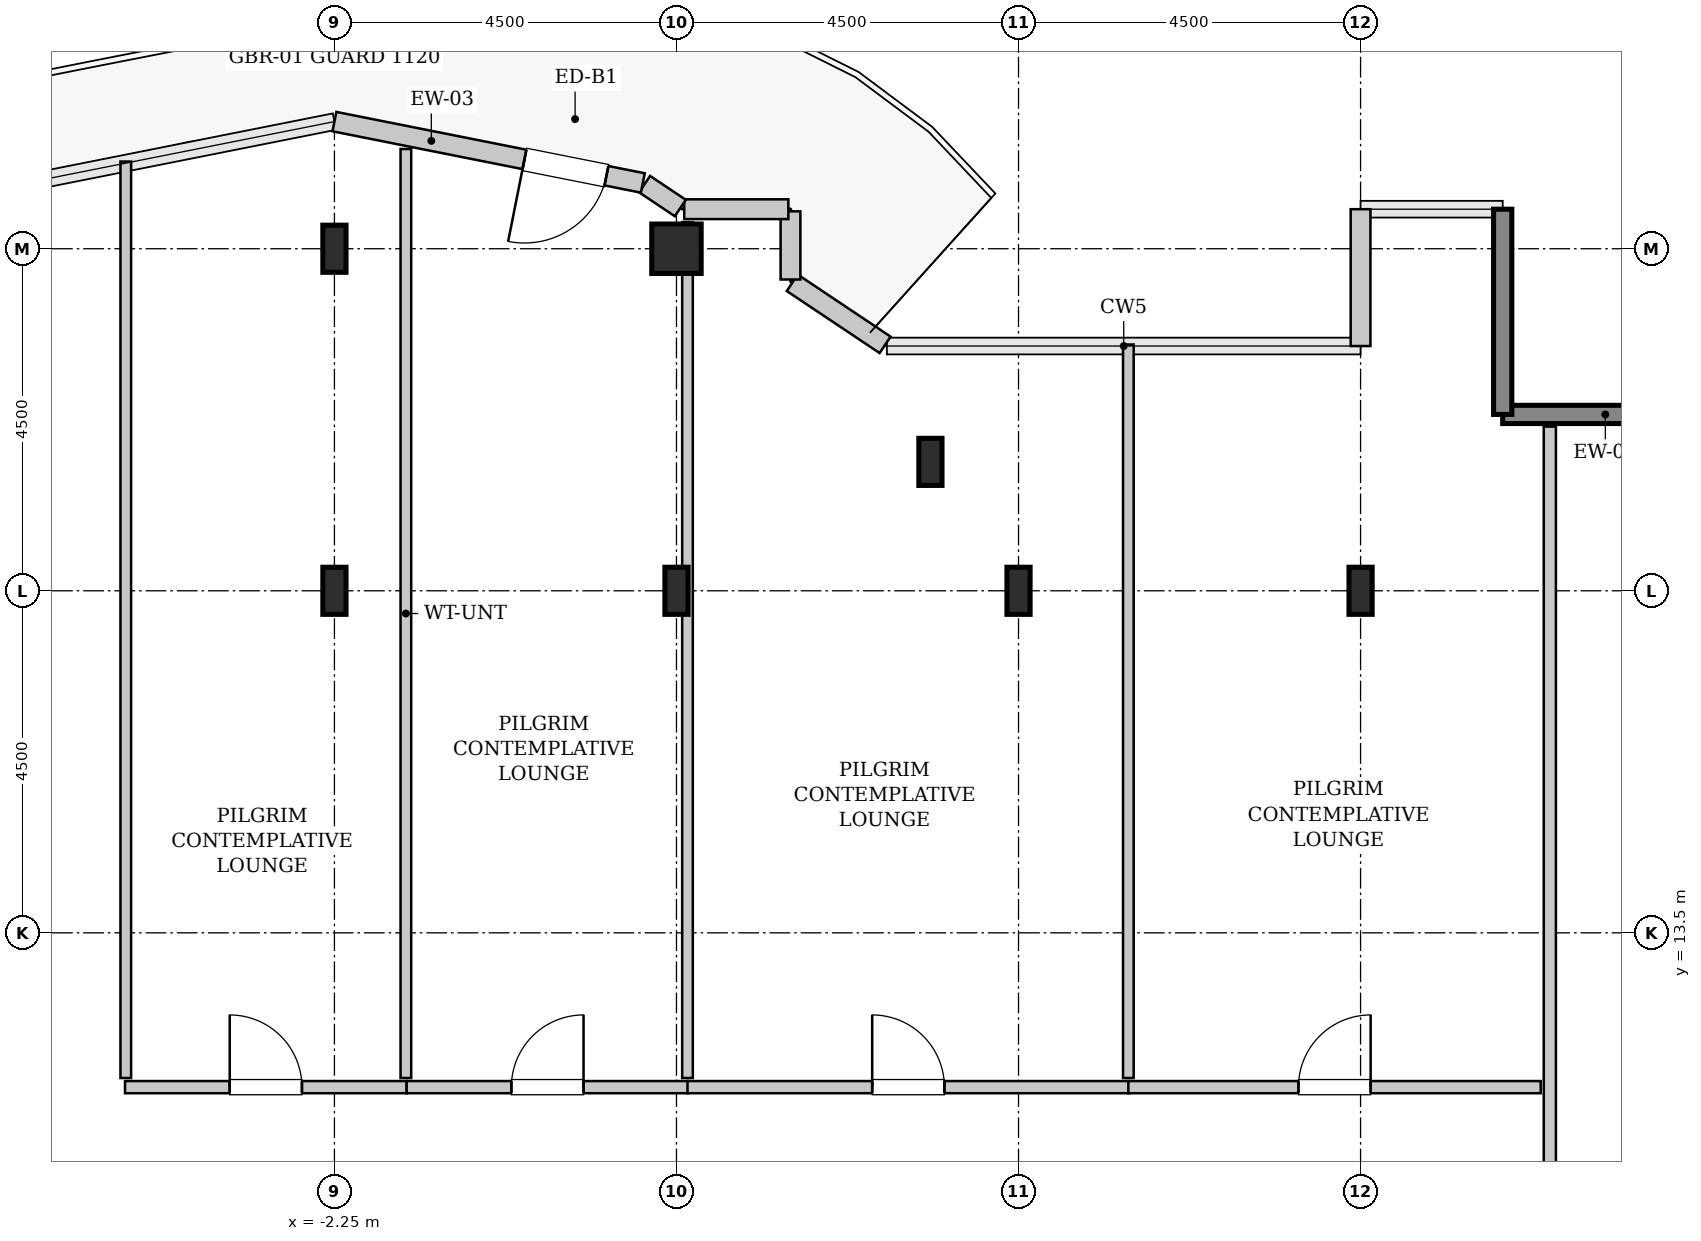
"""IFC4 building model, lengths in metres.
Left out: names, types, materials, properties, quantities, classifications, styles, units other than length and angle.
Written with IfcOpenShell. Run it as: python <this file> out.ifc"""

import sys

from ifc_helpers import new_model, si_unit, direction, frame, frame_2d, origin, origin_2d, place, context, subcontext, project, spatial, rectangle, hollow_rectangle, i_section, extrude, source, transform, mapped, element, fill, save


model = new_model("IFC4")
c1 = context("Model", 3, precision=1e-05, world=origin(), true_north=direction((0.0, 1.0)))
c2 = subcontext(c1, "Body", "Model", "MODEL_VIEW")
j1 = project(units=[si_unit("LENGTHUNIT", "METRE"), si_unit("PLANEANGLEUNIT", "RADIAN")], contexts=[c1])
p1 = place(None, origin())
s1 = spatial("IfcSite", under=j1, at=p1, CompositionType="ELEMENT")
p2 = place(p1, origin())
s2 = spatial("IfcBuilding", under=s1, at=p2, CompositionType="ELEMENT")
p3 = place(p2, frame((0.0, 0.0, 272.2)))
s3 = spatial("IfcBuildingStorey", under=s2, at=p3, CompositionType="ELEMENT", Elevation=272.2)
m1 = source(origin(), c2, "Body", "SweptSolid", [
    extrude(i_section(OverallWidth=0.305, OverallDepth=0.62, WebThickness=0.021, FlangeThickness=0.04, FilletRadius=0.027, at=origin_2d()), origin(), (0.0, 0.0, 1.0), 3.8),
])
for number, where, z_axis, x_axis in (
    (1, (-2.25, 18.0, 0.0), (0.0, 0.0, 1.0), (1.0, 0.0, 0.0)),
    (2, (-2.25, 22.5, 0.0), (0.0, 0.0, 1.0), (1.0, 0.0, 0.0)),
    (3, (2.25, 18.0, 0.0), (0.0, 0.0, 1.0), (1.0, 0.0, 0.0)),
):
    element("IfcColumn", number, at=place(p3, frame(where, z_axis=z_axis, x_axis=x_axis)), inside=s3, PredefinedType="COLUMN", context=c2, shape_type="MappedRepresentation", body=[
        mapped(m1, transform((0.0, 0.0, 0.0), x_axis=(1.0, 0.0, 0.0), y_axis=(0.0, 1.0, 0.0), z_axis=(0.0, 0.0, 1.0), scale=1.0)),
    ])
m2 = source(origin(), c2, "Body", "SweptSolid", [
    extrude(hollow_rectangle(XDim=0.65, YDim=0.65, WallThickness=0.032, InnerFilletRadius=0.032, OuterFilletRadius=0.064, at=origin_2d()), origin(), (0.0, 0.0, 1.0), 3.8),
])
p4 = place(p3, frame((2.25, 22.5, 0.0), z_axis=(0.0, 0.0, 1.0), x_axis=(1.0, 0.0, 0.0)))
e4 = element("IfcColumn", 4, at=p4, inside=s3, PredefinedType="COLUMN", context=c2, shape_type="MappedRepresentation", body=[
    mapped(m2, transform((0.0, 0.0, 0.0), x_axis=(1.0, 0.0, 0.0), y_axis=(0.0, 1.0, 0.0), z_axis=(0.0, 0.0, 1.0), scale=1.0)),
])
for number, where, z_axis, x_axis in (
    (5, (5.591, 19.696, 0.0), (0.0, 0.0, 1.0), (1.0, 0.0, 0.0)),
    (6, (6.75, 18.0, 0.0), (0.0, 0.0, 1.0), (1.0, 0.0, 0.0)),
    (7, (11.25, 18.0, 0.0), (0.0, 0.0, 1.0), (1.0, 0.0, 0.0)),
):
    element("IfcColumn", number, at=place(p3, frame(where, z_axis=z_axis, x_axis=x_axis)), inside=s3, PredefinedType="COLUMN", context=c2, shape_type="MappedRepresentation", body=[
        mapped(m1, transform((0.0, 0.0, 0.0), x_axis=(1.0, 0.0, 0.0), y_axis=(0.0, 1.0, 0.0), z_axis=(0.0, 0.0, 1.0), scale=1.0)),
    ])
m3 = source(origin(), c2, "Body", "SweptSolid", [
    extrude(rectangle(XDim=2.7, YDim=0.24, at=frame_2d((1.35, 0.0))), origin(), (0.0, 0.0, 1.0), 3.55),
])
for number, where, z_axis, x_axis in (
    (8, (15.82, 20.32, 0.0), (0.0, 0.0, 1.0), (-1.0, 0.0, 0.0)),
    (9, (13.12, 20.32, 0.0), (0.0, 0.0, 1.0), (0.0, 1.0, 0.0)),
):
    element("IfcWall", number, at=place(p3, frame(where, z_axis=z_axis, x_axis=x_axis)), inside=s3, PredefinedType="SHEAR", context=c2, shape_type="MappedRepresentation", body=[
        mapped(m3, transform((0.0, 0.0, 0.0), x_axis=(1.0, 0.0, 0.0), y_axis=(0.0, 1.0, 0.0), z_axis=(0.0, 0.0, 1.0), scale=1.0)),
    ])
m4 = source(origin(), c2, "Body", "SweptSolid", [
    extrude(rectangle(XDim=1.8, YDim=0.26, at=frame_2d((0.9, 0.0))), origin(), (0.0, 0.0, 1.0), 3.55),
])
p5 = place(p3, frame((11.25, 23.02, 0.0), z_axis=(0.0, 0.0, 1.0), x_axis=(0.0, -1.0, 0.0)))
e10 = element("IfcWall", 10, at=p5, inside=s3, PredefinedType="SOLIDWALL", context=c2, shape_type="MappedRepresentation", body=[
    mapped(m4, transform((0.0, 0.0, 0.0), x_axis=(1.0, 0.0, 0.0), y_axis=(0.0, 1.0, 0.0), z_axis=(0.0, 0.0, 1.0), scale=1.0)),
])
m5 = source(origin(), c2, "Body", "SweptSolid", [
    extrude(rectangle(XDim=1.469, YDim=0.26, at=frame_2d((0.734, 0.0))), origin(), (0.0, 0.0, 1.0), 3.55),
])
p6 = place(p3, frame((4.995, 21.236, 0.0), z_axis=(0.0, 0.0, 1.0), x_axis=(-0.831461760506, 0.555581983884, 0.0)))
e11 = element("IfcWall", 11, at=p6, inside=s3, PredefinedType="SOLIDWALL", context=c2, shape_type="MappedRepresentation", body=[
    mapped(m5, transform((0.0, 0.0, 0.0), x_axis=(1.0, 0.0, 0.0), y_axis=(0.0, 1.0, 0.0), z_axis=(0.0, 0.0, 1.0), scale=1.0)),
])
m6 = source(origin(), c2, "Body", "SweptSolid", [
    extrude(rectangle(XDim=0.897, YDim=0.26, at=frame_2d((0.448, 0.0))), origin(), (0.0, 0.0, 1.0), 3.55),
])
p7 = place(p3, frame((3.75, 22.095, 0.0), z_axis=(0.0, 0.0, 1.0), x_axis=(0.0, 1.0, 0.0)))
e12 = element("IfcWall", 12, at=p7, inside=s3, PredefinedType="SOLIDWALL", context=c2, shape_type="MappedRepresentation", body=[
    mapped(m6, transform((0.0, 0.0, 0.0), x_axis=(1.0, 0.0, 0.0), y_axis=(0.0, 1.0, 0.0), z_axis=(0.0, 0.0, 1.0), scale=1.0)),
])
m7 = source(origin(), c2, "Body", "SweptSolid", [
    extrude(rectangle(XDim=1.37, YDim=0.26, at=frame_2d((0.685, 0.0))), origin(), (0.0, 0.0, 1.0), 3.55),
])
p8 = place(p3, frame((3.722, 23.02, 0.0), z_axis=(0.0, 0.0, 1.0), x_axis=(-1.0, 0.0, 0.0)))
e13 = element("IfcWall", 13, at=p8, inside=s3, PredefinedType="SOLIDWALL", context=c2, shape_type="MappedRepresentation", body=[
    mapped(m7, transform((0.0, 0.0, 0.0), x_axis=(1.0, 0.0, 0.0), y_axis=(0.0, 1.0, 0.0), z_axis=(0.0, 0.0, 1.0), scale=1.0)),
])
m8 = source(origin(), c2, "Body", "SweptSolid", [
    extrude(rectangle(XDim=0.565, YDim=0.26, at=frame_2d((0.283, 0.0))), origin(), (0.0, 0.0, 1.0), 3.55),
])
p9 = place(p3, frame((2.301, 23.036, 0.0), z_axis=(0.0, 0.0, 1.0), x_axis=(-0.831651492666, 0.555297933317, 0.0)))
e14 = element("IfcWall", 14, at=p9, inside=s3, PredefinedType="SOLIDWALL", context=c2, shape_type="MappedRepresentation", body=[
    mapped(m8, transform((0.0, 0.0, 0.0), x_axis=(1.0, 0.0, 0.0), y_axis=(0.0, 1.0, 0.0), z_axis=(0.0, 0.0, 1.0), scale=1.0)),
])
m9 = source(origin(), c2, "Body", "SweptSolid", [
    extrude(rectangle(XDim=4.137, YDim=0.26, at=frame_2d((2.068, 0.0))), origin(), (0.0, 0.0, 1.0), 3.55),
])
p10 = place(p3, frame((1.807, 23.365, 0.0), z_axis=(0.0, 0.0, 1.0), x_axis=(-0.980782170794, 0.195105954428, 0.0)))
e15 = element("IfcWall", 15, at=p10, inside=s3, PredefinedType="SOLIDWALL", context=c2, shape_type="MappedRepresentation", body=[
    mapped(m9, transform((0.0, 0.0, 0.0), x_axis=(1.0, 0.0, 0.0), y_axis=(0.0, 1.0, 0.0), z_axis=(0.0, 0.0, 1.0), scale=1.0)),
])
p11 = place(p10, frame((0.488, 0.0, 0.0)))
e16 = element("IfcOpeningElement", 16, at=p11, cuts=e15, PredefinedType="OPENING", context=c2, shape_type="SweptSolid", body=[
    extrude(rectangle(XDim=1.1, YDim=2.2, at=frame_2d((0.55, 1.1))), frame((0.0, 0.14, 0.0), z_axis=(0.0, -1.0, 0.0), x_axis=(1.0, 0.0, 0.0)), (0.0, 0.0, 1.0), 0.28),
])
m10 = source(origin(), c2, "Body", "SweptSolid", [
    extrude(rectangle(XDim=11.665, YDim=0.16, at=frame_2d((5.833, 0.0))), origin(), (0.0, 0.0, 1.0), 3.535),
])
p12 = place(p3, frame((13.74, 8.495, 0.0), z_axis=(0.0, 0.0, 1.0), x_axis=(0.0, 1.0, 0.0)))
e17 = element("IfcWall", 17, at=p12, inside=s3, PredefinedType="PARTITIONING", context=c2, shape_type="MappedRepresentation", body=[
    mapped(m10, transform((0.0, 0.0, 0.0), x_axis=(1.0, 0.0, 0.0), y_axis=(0.0, 1.0, 0.0), z_axis=(0.0, 0.0, 1.0), scale=1.0)),
])
p13 = place(p12, frame((1.032, 0.0, 0.0)))
e18 = element("IfcOpeningElement", 18, at=p13, cuts=e17, PredefinedType="OPENING", context=c2, shape_type="SweptSolid", body=[
    extrude(rectangle(XDim=0.95, YDim=2.1, at=frame_2d((0.475, 1.05))), frame((0.0, 0.09, 0.0), z_axis=(0.0, -1.0, 0.0), x_axis=(1.0, 0.0, 0.0)), (0.0, 0.0, 1.0), 0.18),
])
m11 = source(origin(), c2, "Body", "SweptSolid", [
    extrude(rectangle(XDim=3.705, YDim=0.16, at=frame_2d((1.853, 0.0))), origin(), (0.0, 0.0, 1.0), 3.535),
])
p14 = place(p3, frame((-5.005, 11.47, 0.0), z_axis=(0.0, 0.0, 1.0), x_axis=(1.0, 0.0, 0.0)))
e19 = element("IfcWall", 19, at=p14, inside=s3, PredefinedType="PARTITIONING", context=c2, shape_type="MappedRepresentation", body=[
    mapped(m11, transform((0.0, 0.0, 0.0), x_axis=(1.0, 0.0, 0.0), y_axis=(0.0, 1.0, 0.0), z_axis=(0.0, 0.0, 1.0), scale=1.0)),
])
p15 = place(p14, frame((1.377, 0.0, 0.0)))
e20 = element("IfcOpeningElement", 20, at=p15, cuts=e19, PredefinedType="OPENING", context=c2, shape_type="SweptSolid", body=[
    extrude(rectangle(XDim=0.95, YDim=2.1, at=frame_2d((0.475, 1.05))), frame((0.0, 0.09, 0.0), z_axis=(0.0, -1.0, 0.0), x_axis=(1.0, 0.0, 0.0)), (0.0, 0.0, 1.0), 0.18),
])
m12 = source(origin(), c2, "Body", "SweptSolid", [
    extrude(rectangle(XDim=12.222, YDim=0.14, at=frame_2d((6.111, 0.0))), origin(), (0.0, 0.0, 1.0), 3.535),
])
p16 = place(p3, frame((-1.31, 11.59, 0.0), z_axis=(0.0, 0.0, 1.0), x_axis=(0.0, 1.0, 0.0)))
e21 = element("IfcWall", 21, at=p16, inside=s3, PredefinedType="PARTITIONING", context=c2, shape_type="MappedRepresentation", body=[
    mapped(m12, transform((0.0, 0.0, 0.0), x_axis=(1.0, 0.0, 0.0), y_axis=(0.0, 1.0, 0.0), z_axis=(0.0, 0.0, 1.0), scale=1.0)),
])
m13 = source(origin(), c2, "Body", "SweptSolid", [
    extrude(rectangle(XDim=12.057, YDim=0.14, at=frame_2d((6.028, 0.0))), origin(), (0.0, 0.0, 1.0), 3.535),
])
p17 = place(p3, frame((-4.995, 11.59, 0.0), z_axis=(0.0, 0.0, 1.0), x_axis=(0.0, 1.0, 0.0)))
e22 = element("IfcWall", 22, at=p17, inside=s3, PredefinedType="PARTITIONING", context=c2, shape_type="MappedRepresentation", body=[
    mapped(m13, transform((0.0, 0.0, 0.0), x_axis=(1.0, 0.0, 0.0), y_axis=(0.0, 1.0, 0.0), z_axis=(0.0, 0.0, 1.0), scale=1.0)),
])
m14 = source(origin(), c2, "Body", "SweptSolid", [
    extrude(rectangle(XDim=3.705, YDim=0.16, at=frame_2d((1.853, 0.0))), origin(), (0.0, 0.0, 1.0), 3.535),
])
p18 = place(p3, frame((-1.3, 11.47, 0.0), z_axis=(0.0, 0.0, 1.0), x_axis=(1.0, 0.0, 0.0)))
e23 = element("IfcWall", 23, at=p18, inside=s3, PredefinedType="PARTITIONING", context=c2, shape_type="MappedRepresentation", body=[
    mapped(m14, transform((0.0, 0.0, 0.0), x_axis=(1.0, 0.0, 0.0), y_axis=(0.0, 1.0, 0.0), z_axis=(0.0, 0.0, 1.0), scale=1.0)),
])
p19 = place(p18, frame((1.377, 0.0, 0.0)))
e24 = element("IfcOpeningElement", 24, at=p19, cuts=e23, PredefinedType="OPENING", context=c2, shape_type="SweptSolid", body=[
    extrude(rectangle(XDim=0.95, YDim=2.1, at=frame_2d((0.475, 1.05))), frame((0.0, 0.09, 0.0), z_axis=(0.0, -1.0, 0.0), x_axis=(1.0, 0.0, 0.0)), (0.0, 0.0, 1.0), 0.18),
])
m15 = source(origin(), c2, "Body", "SweptSolid", [
    extrude(rectangle(XDim=11.26, YDim=0.14, at=frame_2d((5.63, 0.0))), origin(), (0.0, 0.0, 1.0), 2.925),
])
p20 = place(p3, frame((2.395, 11.59, 0.0), z_axis=(0.0, 0.0, 1.0), x_axis=(0.0, 1.0, 0.0)))
e25 = element("IfcWall", 25, at=p20, inside=s3, PredefinedType="PARTITIONING", context=c2, shape_type="MappedRepresentation", body=[
    mapped(m15, transform((0.0, 0.0, 0.0), x_axis=(1.0, 0.0, 0.0), y_axis=(0.0, 1.0, 0.0), z_axis=(0.0, 0.0, 1.0), scale=1.0)),
])
m16 = source(origin(), c2, "Body", "SweptSolid", [
    extrude(rectangle(XDim=5.81, YDim=0.16, at=frame_2d((2.905, 0.0))), origin(), (0.0, 0.0, 1.0), 3.535),
])
p21 = place(p3, frame((2.395, 11.47, 0.0), z_axis=(0.0, 0.0, 1.0), x_axis=(1.0, 0.0, 0.0)))
e26 = element("IfcWall", 26, at=p21, inside=s3, PredefinedType="PARTITIONING", context=c2, shape_type="MappedRepresentation", body=[
    mapped(m16, transform((0.0, 0.0, 0.0), x_axis=(1.0, 0.0, 0.0), y_axis=(0.0, 1.0, 0.0), z_axis=(0.0, 0.0, 1.0), scale=1.0)),
])
p22 = place(p21, frame((2.43, 0.0, 0.0)))
e27 = element("IfcOpeningElement", 27, at=p22, cuts=e26, PredefinedType="OPENING", context=c2, shape_type="SweptSolid", body=[
    extrude(rectangle(XDim=0.95, YDim=2.1, at=frame_2d((0.475, 1.05))), frame((0.0, 0.09, 0.0), z_axis=(0.0, -1.0, 0.0), x_axis=(1.0, 0.0, 0.0)), (0.0, 0.0, 1.0), 0.18),
])
m17 = source(origin(), c2, "Body", "SweptSolid", [
    extrude(rectangle(XDim=9.65, YDim=0.14, at=frame_2d((4.825, 0.0))), origin(), (0.0, 0.0, 1.0), 3.535),
])
p23 = place(p3, frame((8.195, 11.59, 0.0), z_axis=(0.0, 0.0, 1.0), x_axis=(0.0, 1.0, 0.0)))
e28 = element("IfcWall", 28, at=p23, inside=s3, PredefinedType="PARTITIONING", context=c2, shape_type="MappedRepresentation", body=[
    mapped(m17, transform((0.0, 0.0, 0.0), x_axis=(1.0, 0.0, 0.0), y_axis=(0.0, 1.0, 0.0), z_axis=(0.0, 0.0, 1.0), scale=1.0)),
])
m18 = source(origin(), c2, "Body", "SweptSolid", [
    extrude(rectangle(XDim=5.425, YDim=0.16, at=frame_2d((2.712, 0.0))), origin(), (0.0, 0.0, 1.0), 3.535),
])
p24 = place(p3, frame((8.195, 11.47, 0.0), z_axis=(0.0, 0.0, 1.0), x_axis=(1.0, 0.0, 0.0)))
e29 = element("IfcWall", 29, at=p24, inside=s3, PredefinedType="PARTITIONING", context=c2, shape_type="MappedRepresentation", body=[
    mapped(m18, transform((0.0, 0.0, 0.0), x_axis=(1.0, 0.0, 0.0), y_axis=(0.0, 1.0, 0.0), z_axis=(0.0, 0.0, 1.0), scale=1.0)),
])
p25 = place(p24, frame((2.238, 0.0, 0.0)))
e30 = element("IfcOpeningElement", 30, at=p25, cuts=e29, PredefinedType="OPENING", context=c2, shape_type="SweptSolid", body=[
    extrude(rectangle(XDim=0.95, YDim=2.1, at=frame_2d((0.475, 1.05))), frame((0.0, 0.09, 0.0), z_axis=(0.0, -1.0, 0.0), x_axis=(1.0, 0.0, 0.0)), (0.0, 0.0, 1.0), 0.18),
])
m19 = source(origin(), c2, "Body", "SweptSolid", [
    extrude(rectangle(XDim=1.1, YDim=2.2, at=frame_2d((0.55, 1.1))), frame((0.0, 0.025, 0.0), z_axis=(0.0, -1.0, 0.0), x_axis=(1.0, 0.0, 0.0)), (0.0, 0.0, 1.0), 0.05),
])
p26 = place(p11, origin())
e31 = element("IfcDoor", 31, at=p26, inside=s3, OperationType="SINGLE_SWING_RIGHT", PredefinedType="DOOR", context=c2, shape_type="MappedRepresentation", body=[
    mapped(m19, transform((0.0, 0.0, 0.0), x_axis=(1.0, 0.0, 0.0), y_axis=(0.0, 1.0, 0.0), z_axis=(0.0, 0.0, 1.0), scale=1.0)),
])
fill(e16, e31)
m20 = source(origin(), c2, "Body", "SweptSolid", [
    extrude(rectangle(XDim=0.95, YDim=2.1, at=frame_2d((0.475, 1.05))), frame((0.0, 0.025, 0.0), z_axis=(0.0, -1.0, 0.0), x_axis=(1.0, 0.0, 0.0)), (0.0, 0.0, 1.0), 0.05),
])
p27 = place(p15, origin())
e32 = element("IfcDoor", 32, at=p27, inside=s3, OperationType="SINGLE_SWING_LEFT", PredefinedType="DOOR", context=c2, shape_type="MappedRepresentation", body=[
    mapped(m20, transform((0.0, 0.0, 0.0), x_axis=(1.0, 0.0, 0.0), y_axis=(0.0, 1.0, 0.0), z_axis=(0.0, 0.0, 1.0), scale=1.0)),
])
fill(e20, e32)
p28 = place(p19, origin())
e33 = element("IfcDoor", 33, at=p28, inside=s3, OperationType="SINGLE_SWING_RIGHT", PredefinedType="DOOR", context=c2, shape_type="MappedRepresentation", body=[
    mapped(m20, transform((0.0, 0.0, 0.0), x_axis=(1.0, 0.0, 0.0), y_axis=(0.0, 1.0, 0.0), z_axis=(0.0, 0.0, 1.0), scale=1.0)),
])
fill(e24, e33)
p29 = place(p22, origin())
e34 = element("IfcDoor", 34, at=p29, inside=s3, OperationType="SINGLE_SWING_LEFT", PredefinedType="DOOR", context=c2, shape_type="MappedRepresentation", body=[
    mapped(m20, transform((0.0, 0.0, 0.0), x_axis=(1.0, 0.0, 0.0), y_axis=(0.0, 1.0, 0.0), z_axis=(0.0, 0.0, 1.0), scale=1.0)),
])
fill(e27, e34)
p30 = place(p25, origin())
e35 = element("IfcDoor", 35, at=p30, inside=s3, OperationType="SINGLE_SWING_RIGHT", PredefinedType="DOOR", context=c2, shape_type="MappedRepresentation", body=[
    mapped(m20, transform((0.0, 0.0, 0.0), x_axis=(1.0, 0.0, 0.0), y_axis=(0.0, 1.0, 0.0), z_axis=(0.0, 0.0, 1.0), scale=1.0)),
])
fill(e30, e35)
save(model, sys.argv[1])
